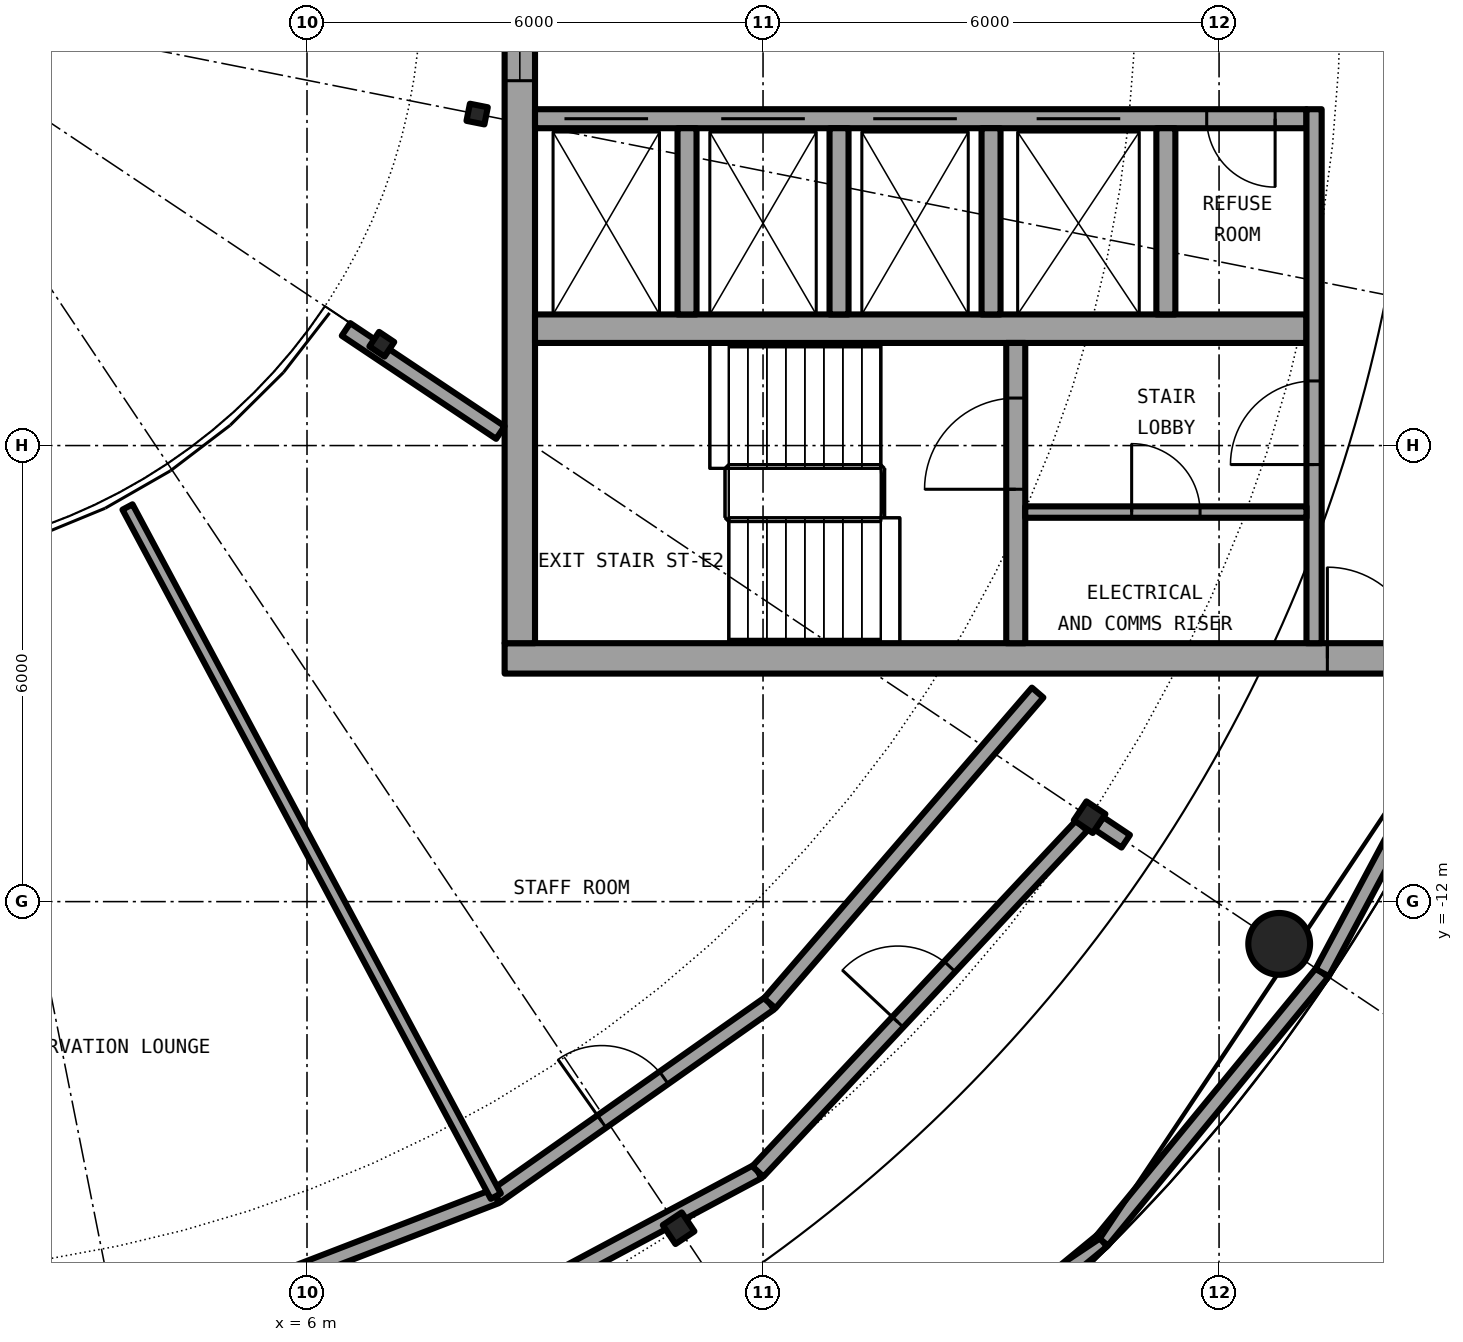
"""IFC4 building model, lengths in metres.
Left out: names, types, materials, properties, quantities, classifications, styles, units other than length and angle.
Written with IfcOpenShell. Run it as: python <this file> out.ifc"""

import sys

from ifc_helpers import new_model, si_unit, direction, frame, frame_2d, origin, origin_2d, place, context, subcontext, project, spatial, rectangle, hollow_circle, i_section, extrude, element, fill, save


model = new_model("IFC4")
c1 = context("Model", 3, precision=1e-05, world=origin(), true_north=direction((0.0, 1.0)))
c2 = subcontext(c1, "Body", "Model", "MODEL_VIEW")
j1 = project(units=[si_unit("LENGTHUNIT", "METRE"), si_unit("PLANEANGLEUNIT", "RADIAN")], contexts=[c1])
p1 = place(None, origin())
s1 = spatial("IfcSite", under=j1, at=p1, CompositionType="ELEMENT")
p2 = place(p1, origin())
s2 = spatial("IfcBuilding", under=s1, at=p2, CompositionType="ELEMENT")
p3 = place(p2, frame((0.0, 0.0, 255.4)))
s3 = spatial("IfcBuildingStorey", under=s2, at=p3, CompositionType="ELEMENT", Elevation=255.4)
p4 = place(p3, frame((18.791, -12.556, 0.0), z_axis=(0.0, 0.0, 1.0), x_axis=(1.0, 0.0, 0.0)))
e1 = element("IfcColumn", 1, at=p4, inside=s3, PredefinedType="COLUMN", context=c2, shape_type="SweptSolid", body=[
    extrude(hollow_circle(Radius=0.406, WallThickness=0.03, at=origin_2d()), origin(), (0.0, 0.0, 1.0), 6.1),
])
for number, where, z_axis, x_axis in (
    (2, (10.889, -16.297, 0.0), (0.0, 0.0, 1.0), (0.556, -0.831, 0.0)),
    (3, (16.297, -10.889, 0.0), (0.0, 0.0, 1.0), (0.831, -0.556, 0.0)),
):
    element("IfcColumn", number, at=place(p3, frame(where, z_axis=z_axis, x_axis=x_axis)), inside=s3, PredefinedType="COLUMN", context=c2, shape_type="SweptSolid", body=[
        extrude(i_section(OverallWidth=0.3, OverallDepth=0.3, WebThickness=0.011, FlangeThickness=0.019, FilletRadius=0.027, at=origin_2d()), origin(), (0.0, 0.0, 1.0), 6.1),
    ])
for number, where, z_axis, x_axis in (
    (4, (6.984, -4.667, 0.0), (0.0, 0.0, 1.0), (0.831, -0.556, 0.0)),
    (5, (8.239, -1.639, 0.0), (0.0, 0.0, 1.0), (0.981, -0.195, 0.0)),
):
    element("IfcColumn", number, at=place(p3, frame(where, z_axis=z_axis, x_axis=x_axis)), inside=s3, PredefinedType="COLUMN", context=c2, shape_type="SweptSolid", body=[
        extrude(i_section(OverallWidth=0.24, OverallDepth=0.23, WebThickness=0.008, FlangeThickness=0.012, FilletRadius=0.021, at=origin_2d()), origin(), (0.0, 0.0, 1.0), 6.1),
    ])
for number, where, z_axis, x_axis in (
    (6, (12.934, -19.357, 6.1), (0.0, 0.0, 1.0), (0.773, 0.635, 0.0)),
    (7, (16.461, -16.461, 6.1), (0.0, 0.0, 1.0), (0.635, 0.773, 0.0)),
):
    element("IfcWall", number, at=place(p3, frame(where, z_axis=z_axis, x_axis=x_axis)), inside=s3, PredefinedType="PARAPET", context=c2, shape_type="SweptSolid", body=[
        extrude(rectangle(XDim=4.563, YDim=0.2, at=frame_2d((2.282, 0.0))), origin(), (0.0, 0.0, 1.0), 1.1),
    ])
p5 = place(p3, frame((19.357, -12.934, 6.1), z_axis=(0.0, 0.0, 1.0), x_axis=(0.471334945511, 0.881954289711, 0.0)))
e8 = element("IfcWall", 8, at=p5, inside=s3, PredefinedType="PARAPET", context=c2, shape_type="SweptSolid", body=[
    extrude(rectangle(XDim=4.564, YDim=0.2, at=frame_2d((2.282, 0.0))), origin(), (0.0, 0.0, 1.0), 1.1),
])
p6 = place(p3, frame((8.6, -8.8, 0.0), z_axis=(0.0, 0.0, 1.0), x_axis=(1.0, 0.0, 0.0)))
e9 = element("IfcWall", 9, at=p6, inside=s3, PredefinedType="SHEAR", context=c2, shape_type="SweptSolid", body=[
    extrude(rectangle(XDim=12.5, YDim=0.4, at=frame_2d((6.25, 0.0))), origin(), (0.0, 0.0, 1.0), 6.1),
])
p7 = place(p6, frame((10.825, 0.0, 0.0)))
e10 = element("IfcOpeningElement", 10, at=p7, cuts=e9, PredefinedType="OPENING", context=c2, shape_type="SweptSolid", body=[
    extrude(rectangle(XDim=1.2, YDim=2.3, at=frame_2d((0.6, 1.15))), frame((0.0, 0.21, 0.0), z_axis=(0.0, -1.0, 0.0), x_axis=(1.0, 0.0, 0.0)), (0.0, 0.0, 1.0), 0.42),
])
p8 = place(p3, frame((8.8, -8.6, 0.0), z_axis=(0.0, 0.0, 1.0), x_axis=(0.0, 1.0, 0.0)))
e11 = element("IfcWall", 11, at=p8, inside=s3, PredefinedType="SHEAR", context=c2, shape_type="SweptSolid", body=[
    extrude(rectangle(XDim=17.2, YDim=0.4, at=frame_2d((8.6, 0.0))), origin(), (0.0, 0.0, 1.0), 6.1),
])
p9 = place(p8, frame((7.4, 0.0, 0.1)))
e12 = element("IfcOpeningElement", 12, at=p9, cuts=e11, PredefinedType="OPENING", context=c2, shape_type="SweptSolid", body=[
    extrude(rectangle(XDim=2.4, YDim=2.2, at=frame_2d((1.2, 1.1))), frame((0.0, 0.21, 0.0), z_axis=(0.0, -1.0, 0.0), x_axis=(1.0, 0.0, 0.0)), (0.0, 0.0, 1.0), 0.42),
])
p10 = place(p3, frame((19.15, -1.7, 0.0), z_axis=(0.0, 0.0, 1.0), x_axis=(-1.0, 0.0, 0.0)))
e13 = element("IfcWall", 13, at=p10, inside=s3, PredefinedType="SHEAR", context=c2, shape_type="SweptSolid", body=[
    extrude(rectangle(XDim=10.15, YDim=0.25, at=frame_2d((5.075, 0.0))), origin(), (0.0, 0.0, 1.0), 6.1),
])
p11 = place(p10, frame((8.663, 0.0, 0.0)))
e14 = element("IfcOpeningElement", 14, at=p11, cuts=e13, PredefinedType="OPENING", context=c2, shape_type="SweptSolid", body=[
    extrude(rectangle(XDim=1.1, YDim=2.3, at=frame_2d((0.55, 1.15))), frame((0.0, 0.135, 0.0), z_axis=(0.0, -1.0, 0.0), x_axis=(1.0, 0.0, 0.0)), (0.0, 0.0, 1.0), 0.27),
])
p12 = place(p10, frame((6.6, 0.0, 0.0)))
e15 = element("IfcOpeningElement", 15, at=p12, cuts=e13, PredefinedType="OPENING", context=c2, shape_type="SweptSolid", body=[
    extrude(rectangle(XDim=1.1, YDim=2.3, at=frame_2d((0.55, 1.15))), frame((0.0, 0.135, 0.0), z_axis=(0.0, -1.0, 0.0), x_axis=(1.0, 0.0, 0.0)), (0.0, 0.0, 1.0), 0.27),
])
p13 = place(p10, frame((4.6, 0.0, 0.0)))
e16 = element("IfcOpeningElement", 16, at=p13, cuts=e13, PredefinedType="OPENING", context=c2, shape_type="SweptSolid", body=[
    extrude(rectangle(XDim=1.1, YDim=2.3, at=frame_2d((0.55, 1.15))), frame((0.0, 0.135, 0.0), z_axis=(0.0, -1.0, 0.0), x_axis=(1.0, 0.0, 0.0)), (0.0, 0.0, 1.0), 0.27),
])
p14 = place(p10, frame((2.45, 0.0, 0.0)))
e17 = element("IfcOpeningElement", 17, at=p14, cuts=e13, PredefinedType="OPENING", context=c2, shape_type="SweptSolid", body=[
    extrude(rectangle(XDim=1.1, YDim=2.3, at=frame_2d((0.55, 1.15))), frame((0.0, 0.135, 0.0), z_axis=(0.0, -1.0, 0.0), x_axis=(1.0, 0.0, 0.0)), (0.0, 0.0, 1.0), 0.27),
])
p15 = place(p10, frame((0.413, 0.0, 0.0)))
e18 = element("IfcOpeningElement", 18, at=p15, cuts=e13, PredefinedType="OPENING", context=c2, shape_type="SweptSolid", body=[
    extrude(rectangle(XDim=0.9, YDim=2.3, at=frame_2d((0.45, 1.15))), frame((0.0, 0.135, 0.0), z_axis=(0.0, -1.0, 0.0), x_axis=(1.0, 0.0, 0.0)), (0.0, 0.0, 1.0), 0.27),
])
p16 = place(p3, frame((9.0, -4.462, 0.0), z_axis=(0.0, 0.0, 1.0), x_axis=(1.0, 0.0, 0.0)))
e19 = element("IfcWall", 19, at=p16, inside=s3, PredefinedType="SHEAR", context=c2, shape_type="SweptSolid", body=[
    extrude(rectangle(XDim=10.15, YDim=0.375, at=frame_2d((5.075, 0.0))), origin(), (0.0, 0.0, 1.0), 6.1),
])
p17 = place(p3, frame((15.325, -8.6, 0.0), z_axis=(0.0, 0.0, 1.0), x_axis=(0.0, 1.0, 0.0)))
e20 = element("IfcWall", 20, at=p17, inside=s3, PredefinedType="SHEAR", context=c2, shape_type="SweptSolid", body=[
    extrude(rectangle(XDim=3.95, YDim=0.25, at=frame_2d((1.975, 0.0))), origin(), (0.0, 0.0, 1.0), 6.1),
])
p18 = place(p17, frame((2.025, 0.0, 0.0)))
e21 = element("IfcOpeningElement", 21, at=p18, cuts=e20, PredefinedType="OPENING", context=c2, shape_type="SweptSolid", body=[
    extrude(rectangle(XDim=1.2, YDim=2.3, at=frame_2d((0.6, 1.15))), frame((0.0, 0.135, 0.0), z_axis=(0.0, -1.0, 0.0), x_axis=(1.0, 0.0, 0.0)), (0.0, 0.0, 1.0), 0.27),
])
for number, where, z_axis, x_axis in (
    (22, (15.0, -1.825, 0.0), (0.0, 0.0, 1.0), (0.0, -1.0, 0.0)),
    (23, (17.3, -1.825, 0.0), (0.0, 0.0, 1.0), (0.0, -1.0, 0.0)),
):
    element("IfcWall", number, at=place(p3, frame(where, z_axis=z_axis, x_axis=x_axis)), inside=s3, PredefinedType="SOLIDWALL", context=c2, shape_type="SweptSolid", body=[
        extrude(rectangle(XDim=2.45, YDim=0.25, at=frame_2d((1.225, 0.0))), origin(), (0.0, 0.0, 1.0), 5.75),
    ])
p19 = place(p3, frame((19.25, -8.6, 0.0), z_axis=(0.0, 0.0, 1.0), x_axis=(0.0, 1.0, 0.0)))
e24 = element("IfcWall", 24, at=p19, inside=s3, PredefinedType="SOLIDWALL", context=c2, shape_type="SweptSolid", body=[
    extrude(rectangle(XDim=7.025, YDim=0.2, at=frame_2d((3.513, 0.0))), origin(), (0.0, 0.0, 1.0), 5.75),
])
p20 = place(p19, frame((2.35, 0.0, 0.0)))
e25 = element("IfcOpeningElement", 25, at=p20, cuts=e24, PredefinedType="OPENING", context=c2, shape_type="SweptSolid", body=[
    extrude(rectangle(XDim=1.1, YDim=2.3, at=frame_2d((0.55, 1.15))), frame((0.0, 0.11, 0.0), z_axis=(0.0, -1.0, 0.0), x_axis=(1.0, 0.0, 0.0)), (0.0, 0.0, 1.0), 0.22),
])
for number, where, z_axis, x_axis in (
    (26, (11.0, -1.825, 0.0), (0.0, 0.0, 1.0), (0.0, -1.0, 0.0)),
    (27, (13.0, -1.825, 0.0), (0.0, 0.0, 1.0), (0.0, -1.0, 0.0)),
):
    element("IfcWall", number, at=place(p3, frame(where, z_axis=z_axis, x_axis=x_axis)), inside=s3, PredefinedType="SOLIDWALL", context=c2, shape_type="SweptSolid", body=[
        extrude(rectangle(XDim=2.45, YDim=0.25, at=frame_2d((1.225, 0.0))), origin(), (0.0, 0.0, 1.0), 5.75),
    ])
p21 = place(p3, frame((15.45, -6.875, 0.0), z_axis=(0.0, 0.0, 1.0), x_axis=(1.0, 0.0, 0.0)))
e28 = element("IfcWall", 28, at=p21, inside=s3, PredefinedType="PARTITIONING", context=c2, shape_type="SweptSolid", body=[
    extrude(rectangle(XDim=3.7, YDim=0.15, at=frame_2d((1.85, 0.0))), origin(), (0.0, 0.0, 1.0), 5.75),
])
p22 = place(p21, frame((1.4, 0.0, 0.0)))
e29 = element("IfcOpeningElement", 29, at=p22, cuts=e28, PredefinedType="OPENING", context=c2, shape_type="SweptSolid", body=[
    extrude(rectangle(XDim=0.9, YDim=2.3, at=frame_2d((0.45, 1.15))), frame((0.0, 0.085, 0.0), z_axis=(0.0, -1.0, 0.0), x_axis=(1.0, 0.0, 0.0)), (0.0, 0.0, 1.0), 0.17),
])
p23 = place(p3, frame((6.3, -18.56, 0.0), z_axis=(0.0, 0.0, 1.0), x_axis=(0.88193879345, 0.471363940716, 0.0)))
e30 = element("IfcWall", 30, at=p23, inside=s3, PredefinedType="PARTITIONING", context=c2, shape_type="SweptSolid", body=[
    extrude(rectangle(XDim=6.386, YDim=0.2, at=frame_2d((3.193, 0.0))), origin(), (0.0, 0.0, 1.0), 5.5),
])
p24 = place(p3, frame((11.932, -15.55, 0.0), z_axis=(0.0, 0.0, 1.0), x_axis=(0.683561939148, 0.729892509448, 0.0)))
e31 = element("IfcWall", 31, at=p24, inside=s3, PredefinedType="PARTITIONING", context=c2, shape_type="SweptSolid", body=[
    extrude(rectangle(XDim=6.234, YDim=0.2, at=frame_2d((3.117, 0.0))), origin(), (0.0, 0.0, 1.0), 5.5),
])
p25 = place(p24, frame((2.693, 0.0, 0.0)))
e32 = element("IfcOpeningElement", 32, at=p25, cuts=e31, PredefinedType="OPENING", context=c2, shape_type="SweptSolid", body=[
    extrude(rectangle(XDim=1.0, YDim=2.3, at=frame_2d((0.5, 1.15))), frame((0.0, 0.11, 0.0), z_axis=(0.0, -1.0, 0.0), x_axis=(1.0, 0.0, 0.0)), (0.0, 0.0, 1.0), 0.22),
])
p26 = place(p3, frame((4.374, -17.461, 0.0), z_axis=(0.0, 0.0, 1.0), x_axis=(0.932983851272, 0.35991823136, 0.0)))
e33 = element("IfcWall", 33, at=p26, inside=s3, PredefinedType="PARTITIONING", context=c2, shape_type="SweptSolid", body=[
    extrude(rectangle(XDim=4.406, YDim=0.2, at=frame_2d((2.203, 0.0))), origin(), (0.0, 0.0, 1.0), 5.75),
])
p27 = place(p3, frame((8.485, -15.875, 0.0), z_axis=(0.0, 0.0, 1.0), x_axis=(0.817507922666, 0.575917352038, 0.0)))
e34 = element("IfcWall", 34, at=p27, inside=s3, PredefinedType="PARTITIONING", context=c2, shape_type="SweptSolid", body=[
    extrude(rectangle(XDim=4.407, YDim=0.2, at=frame_2d((2.204, 0.0))), origin(), (0.0, 0.0, 1.0), 5.75),
])
p28 = place(p27, frame((1.704, 0.0, 0.0)))
e35 = element("IfcOpeningElement", 35, at=p28, cuts=e34, PredefinedType="OPENING", context=c2, shape_type="SweptSolid", body=[
    extrude(rectangle(XDim=1.0, YDim=2.3, at=frame_2d((0.5, 1.15))), frame((0.0, 0.11, 0.0), z_axis=(0.0, -1.0, 0.0), x_axis=(1.0, 0.0, 0.0)), (0.0, 0.0, 1.0), 0.22),
])
p29 = place(p3, frame((12.088, -13.337, 0.0), z_axis=(0.0, 0.0, 1.0), x_axis=(0.653146301984, 0.757231740093, 0.0)))
e36 = element("IfcWall", 36, at=p29, inside=s3, PredefinedType="PARTITIONING", context=c2, shape_type="SweptSolid", body=[
    extrude(rectangle(XDim=5.397, YDim=0.2, at=frame_2d((2.699, 0.0))), origin(), (0.0, 0.0, 1.0), 5.75),
])
p30 = place(p3, frame((6.513, -4.472, 0.0), z_axis=(0.0, 0.0, 1.0), x_axis=(0.831450132577, -0.555599385382, 0.0)))
e37 = element("IfcWall", 37, at=p30, inside=s3, PredefinedType="PARTITIONING", context=c2, shape_type="SweptSolid", body=[
    extrude(rectangle(XDim=2.443, YDim=0.2, at=frame_2d((1.221, 0.0))), origin(), (0.0, 0.0, 1.0), 5.75),
])
p31 = place(p3, frame((3.638, -6.808, 0.0), z_axis=(0.0, 0.0, 1.0), x_axis=(0.471365806418, -0.881937796299, 0.0)))
e38 = element("IfcWall", 38, at=p31, inside=s3, PredefinedType="PARTITIONING", context=c2, shape_type="SweptSolid", body=[
    extrude(rectangle(XDim=10.281, YDim=0.15, at=frame_2d((5.14, 0.0))), origin(), (0.0, 0.0, 1.0), 5.75),
])
p32 = place(p3, frame((16.422, -10.972, 0.0), z_axis=(0.0, 0.0, 1.0), x_axis=(0.831067539056, -0.556171507296, 0.0)))
e39 = element("IfcWall", 39, at=p32, inside=s3, PredefinedType="PARTITIONING", context=c2, shape_type="SweptSolid", body=[
    extrude(rectangle(XDim=0.421, YDim=0.2, at=frame_2d((0.21, 0.0))), origin(), (0.0, 0.0, 1.0), 5.75),
])
p33 = place(p11, origin())
e40 = element("IfcDoor", 40, at=p33, inside=s3, OperationType="DOUBLE_DOOR_SLIDING", PredefinedType="DOOR", context=c2, shape_type="SweptSolid", body=[
    extrude(rectangle(XDim=1.1, YDim=2.3, at=frame_2d((0.55, 1.15))), frame((0.0, 0.025, 0.0), z_axis=(0.0, -1.0, 0.0), x_axis=(1.0, 0.0, 0.0)), (0.0, 0.0, 1.0), 0.05),
])
fill(e14, e40)
p34 = place(p12, origin())
e41 = element("IfcDoor", 41, at=p34, inside=s3, OperationType="DOUBLE_DOOR_SLIDING", PredefinedType="DOOR", context=c2, shape_type="SweptSolid", body=[
    extrude(rectangle(XDim=1.1, YDim=2.3, at=frame_2d((0.55, 1.15))), frame((0.0, 0.025, 0.0), z_axis=(0.0, -1.0, 0.0), x_axis=(1.0, 0.0, 0.0)), (0.0, 0.0, 1.0), 0.05),
])
fill(e15, e41)
p35 = place(p13, origin())
e42 = element("IfcDoor", 42, at=p35, inside=s3, OperationType="DOUBLE_DOOR_SLIDING", PredefinedType="DOOR", context=c2, shape_type="SweptSolid", body=[
    extrude(rectangle(XDim=1.1, YDim=2.3, at=frame_2d((0.55, 1.15))), frame((0.0, 0.025, 0.0), z_axis=(0.0, -1.0, 0.0), x_axis=(1.0, 0.0, 0.0)), (0.0, 0.0, 1.0), 0.05),
])
fill(e16, e42)
p36 = place(p14, origin())
e43 = element("IfcDoor", 43, at=p36, inside=s3, OperationType="DOUBLE_DOOR_SLIDING", PredefinedType="DOOR", context=c2, shape_type="SweptSolid", body=[
    extrude(rectangle(XDim=1.1, YDim=2.3, at=frame_2d((0.55, 1.15))), frame((0.0, 0.025, 0.0), z_axis=(0.0, -1.0, 0.0), x_axis=(1.0, 0.0, 0.0)), (0.0, 0.0, 1.0), 0.05),
])
fill(e17, e43)
p37 = place(p15, origin())
e44 = element("IfcDoor", 44, at=p37, inside=s3, OperationType="SINGLE_SWING_RIGHT", PredefinedType="DOOR", context=c2, shape_type="SweptSolid", body=[
    extrude(rectangle(XDim=0.9, YDim=2.3, at=frame_2d((0.45, 1.15))), frame((0.0, 0.025, 0.0), z_axis=(0.0, -1.0, 0.0), x_axis=(1.0, 0.0, 0.0)), (0.0, 0.0, 1.0), 0.05),
])
fill(e18, e44)
p38 = place(p22, origin())
e45 = element("IfcDoor", 45, at=p38, inside=s3, OperationType="SINGLE_SWING_LEFT", PredefinedType="DOOR", context=c2, shape_type="SweptSolid", body=[
    extrude(rectangle(XDim=0.9, YDim=2.3, at=frame_2d((0.45, 1.15))), frame((0.0, 0.025, 0.0), z_axis=(0.0, -1.0, 0.0), x_axis=(1.0, 0.0, 0.0)), (0.0, 0.0, 1.0), 0.05),
])
fill(e29, e45)
p39 = place(p18, origin())
e46 = element("IfcDoor", 46, at=p39, inside=s3, OperationType="SINGLE_SWING_LEFT", PredefinedType="DOOR", context=c2, shape_type="SweptSolid", body=[
    extrude(rectangle(XDim=1.2, YDim=2.3, at=frame_2d((0.6, 1.15))), frame((0.0, 0.025, 0.0), z_axis=(0.0, -1.0, 0.0), x_axis=(1.0, 0.0, 0.0)), (0.0, 0.0, 1.0), 0.05),
])
fill(e21, e46)
p40 = place(p20, origin())
e47 = element("IfcDoor", 47, at=p40, inside=s3, OperationType="SINGLE_SWING_RIGHT", PredefinedType="DOOR", context=c2, shape_type="SweptSolid", body=[
    extrude(rectangle(XDim=1.1, YDim=2.3, at=frame_2d((0.55, 1.15))), frame((0.0, 0.025, 0.0), z_axis=(0.0, -1.0, 0.0), x_axis=(1.0, 0.0, 0.0)), (0.0, 0.0, 1.0), 0.05),
])
fill(e25, e47)
p41 = place(p7, origin())
e48 = element("IfcDoor", 48, at=p41, inside=s3, OperationType="SINGLE_SWING_LEFT", PredefinedType="DOOR", context=c2, shape_type="SweptSolid", body=[
    extrude(rectangle(XDim=1.2, YDim=2.3, at=frame_2d((0.6, 1.15))), frame((0.0, 0.025, 0.0), z_axis=(0.0, -1.0, 0.0), x_axis=(1.0, 0.0, 0.0)), (0.0, 0.0, 1.0), 0.05),
])
fill(e10, e48)
p42 = place(p9, origin())
e49 = element("IfcWindow", 49, at=p42, inside=s3, PartitioningType="SINGLE_PANEL", PredefinedType="WINDOW", context=c2, shape_type="SweptSolid", body=[
    extrude(rectangle(XDim=2.4, YDim=2.2, at=frame_2d((1.2, 1.1))), frame((0.0, 0.03, 0.0), z_axis=(0.0, -1.0, 0.0), x_axis=(1.0, 0.0, 0.0)), (0.0, 0.0, 1.0), 0.06),
])
fill(e12, e49)
p43 = place(p25, origin())
e50 = element("IfcDoor", 50, at=p43, inside=s3, OperationType="SINGLE_SWING_RIGHT", PredefinedType="DOOR", context=c2, shape_type="SweptSolid", body=[
    extrude(rectangle(XDim=1.0, YDim=2.3, at=frame_2d((0.5, 1.15))), frame((0.0, 0.025, 0.0), z_axis=(0.0, -1.0, 0.0), x_axis=(1.0, 0.0, 0.0)), (0.0, 0.0, 1.0), 0.05),
])
fill(e32, e50)
p44 = place(p28, origin())
e51 = element("IfcDoor", 51, at=p44, inside=s3, OperationType="SINGLE_SWING_RIGHT", PredefinedType="DOOR", context=c2, shape_type="SweptSolid", body=[
    extrude(rectangle(XDim=1.0, YDim=2.3, at=frame_2d((0.5, 1.15))), frame((0.0, 0.025, 0.0), z_axis=(0.0, -1.0, 0.0), x_axis=(1.0, 0.0, 0.0)), (0.0, 0.0, 1.0), 0.05),
])
fill(e35, e51)
save(model, sys.argv[1])
